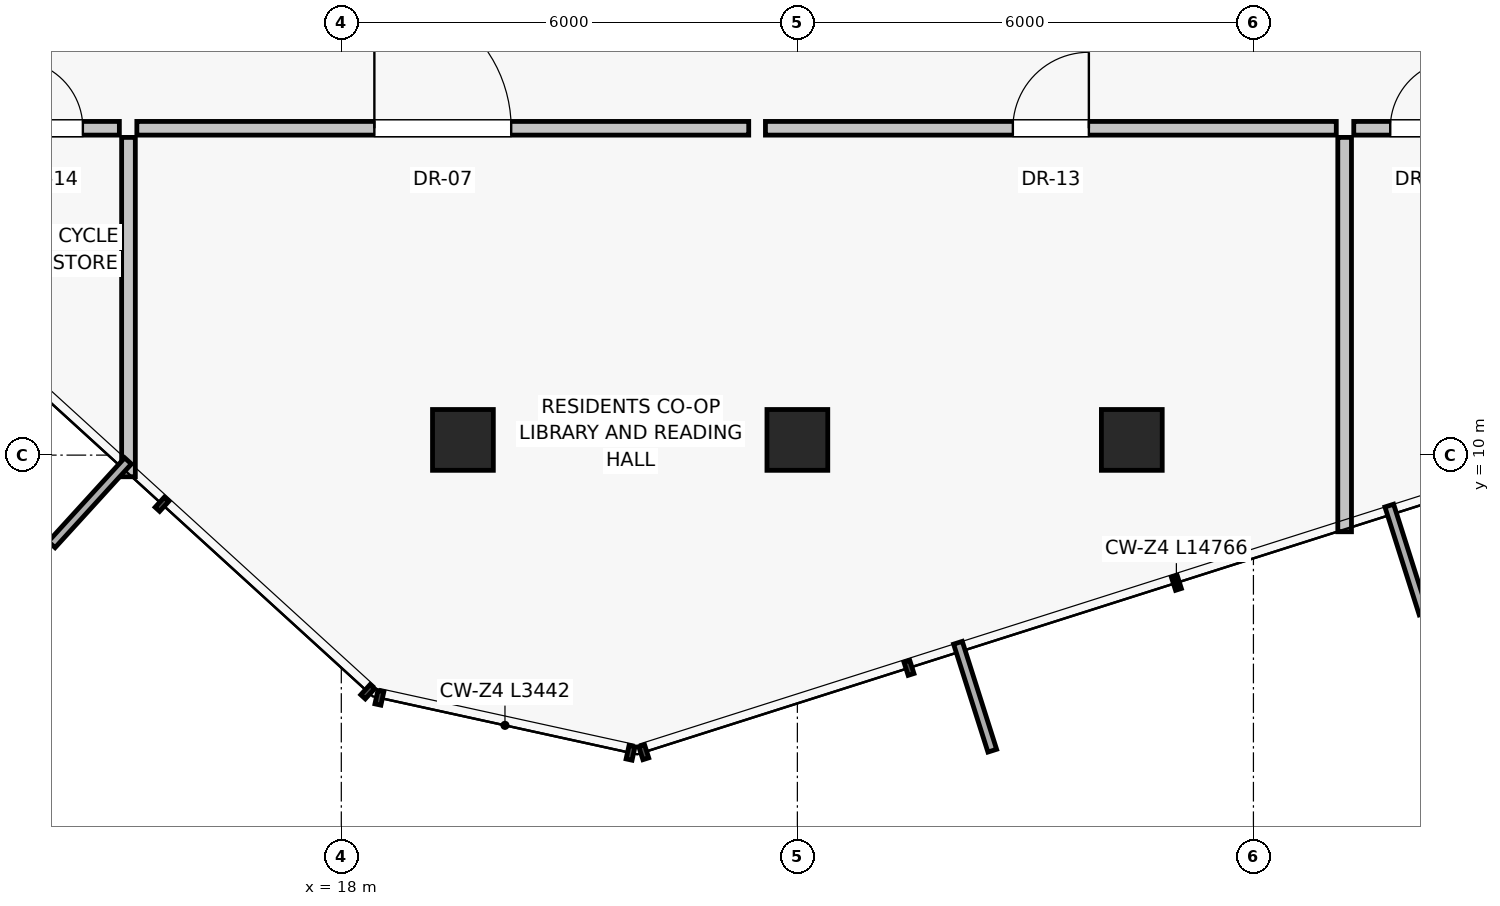
"""IFC4 building model, lengths in metres.
Left out: names, types, materials, properties, quantities, classifications, styles, units other than length and angle.
Written with IfcOpenShell. Run it as: python <this file> out.ifc"""

import sys

from ifc_helpers import new_model, si_unit, direction, frame, frame_2d, origin, origin_2d, place, context, subcontext, project, spatial, rectangle, extrude, source, transform, mapped, element, fill, save


model = new_model("IFC4")
c1 = context("Model", 3, precision=1e-05, world=origin(), true_north=direction((0.0, 1.0)))
c2 = subcontext(c1, "Body", "Model", "MODEL_VIEW")
j1 = project(units=[si_unit("LENGTHUNIT", "METRE"), si_unit("PLANEANGLEUNIT", "RADIAN")], contexts=[c1])
p1 = place(None, origin())
s1 = spatial("IfcSite", under=j1, at=p1, CompositionType="ELEMENT")
p2 = place(p1, origin())
s2 = spatial("IfcBuilding", under=s1, at=p2, CompositionType="ELEMENT")
p3 = place(p2, frame((0.0, 0.0, 251.25)))
s3 = spatial("IfcBuildingStorey", under=s2, at=p3, CompositionType="ELEMENT", Elevation=251.25)
for number, where, z_axis, x_axis in (
    (1, (19.6, 10.2, 0.0), (0.0, 0.0, 1.0), (1.0, 0.0, 0.0)),
    (2, (24.0, 10.2, 0.0), (0.0, 0.0, 1.0), (1.0, 0.0, 0.0)),
    (3, (28.4, 10.2, 0.0), (0.0, 0.0, 1.0), (1.0, 0.0, 0.0)),
):
    element("IfcColumn", number, at=place(p3, frame(where, z_axis=z_axis, x_axis=x_axis)), inside=s3, PredefinedType="COLUMN", context=c2, shape_type="SweptSolid", body=[
        extrude(rectangle(XDim=0.8, YDim=0.8, at=origin_2d()), origin(), (0.0, 0.0, 1.0), 3.25),
    ])
p4 = place(p3, frame((15.2, 14.18, 0.0), z_axis=(0.0, 0.0, 1.0), x_axis=(0.0, -1.0, 0.0)))
e4 = element("IfcWall", 4, at=p4, inside=s3, PredefinedType="PARTITIONING", context=c2, shape_type="SweptSolid", body=[
    extrude(rectangle(XDim=4.464, YDim=0.18, at=frame_2d((2.232, 0.0))), origin(), (0.0, 0.0, 1.0), 3.015),
])
p5 = place(p3, frame((31.2, 14.18, 0.0), z_axis=(0.0, 0.0, 1.0), x_axis=(0.0, -1.0, 0.0)))
e5 = element("IfcWall", 5, at=p5, inside=s3, PredefinedType="PARTITIONING", context=c2, shape_type="SweptSolid", body=[
    extrude(rectangle(XDim=5.188, YDim=0.18, at=frame_2d((2.594, 0.0))), origin(), (0.0, 0.0, 1.0), 3.015),
])
p6 = place(p3, frame((15.31, 14.3, 0.0), z_axis=(0.0, 0.0, 1.0), x_axis=(1.0, 0.0, 0.0)))
e6 = element("IfcWall", 6, at=p6, inside=s3, PredefinedType="PARTITIONING", context=c2, shape_type="SweptSolid", body=[
    extrude(rectangle(XDim=8.05, YDim=0.18, at=frame_2d((4.025, 0.0))), origin(), (0.0, 0.0, 1.0), 3.015),
])
p7 = place(p6, frame((3.125, 0.0, 0.0)))
e7 = element("IfcOpeningElement", 7, at=p7, cuts=e6, PredefinedType="OPENING", context=c2, shape_type="SweptSolid", body=[
    extrude(rectangle(XDim=1.8, YDim=2.25, at=frame_2d((0.9, 1.125))), frame((0.0, 0.1, 0.0), z_axis=(0.0, -1.0, 0.0), x_axis=(1.0, 0.0, 0.0)), (0.0, 0.0, 1.0), 0.2),
])
p8 = place(p3, frame((23.58, 14.3, 0.0), z_axis=(0.0, 0.0, 1.0), x_axis=(1.0, 0.0, 0.0)))
e8 = element("IfcWall", 8, at=p8, inside=s3, PredefinedType="PARTITIONING", context=c2, shape_type="SweptSolid", body=[
    extrude(rectangle(XDim=7.51, YDim=0.18, at=frame_2d((3.755, 0.0))), origin(), (0.0, 0.0, 1.0), 3.015),
])
p9 = place(p8, frame((3.255, 0.0, 0.0)))
e9 = element("IfcOpeningElement", 9, at=p9, cuts=e8, PredefinedType="OPENING", context=c2, shape_type="SweptSolid", body=[
    extrude(rectangle(XDim=1.0, YDim=2.01, at=frame_2d((0.5, 1.005))), frame((0.0, 0.1, 0.0), z_axis=(0.0, -1.0, 0.0), x_axis=(1.0, 0.0, 0.0)), (0.0, 0.0, 1.0), 0.2),
])
p10 = place(p3, frame((13.22, 14.3, 0.0), z_axis=(0.0, 0.0, 1.0), x_axis=(1.0, 0.0, 0.0)))
e10 = element("IfcWall", 10, at=p10, inside=s3, PredefinedType="PARTITIONING", context=c2, shape_type="SweptSolid", body=[
    extrude(rectangle(XDim=1.86, YDim=0.18, at=frame_2d((0.93, 0.0))), origin(), (0.0, 0.0, 1.0), 3.015),
])
p11 = place(p10, frame((0.48, 0.0, 0.0)))
e11 = element("IfcOpeningElement", 11, at=p11, cuts=e10, PredefinedType="OPENING", context=c2, shape_type="SweptSolid", body=[
    extrude(rectangle(XDim=0.9, YDim=2.01, at=frame_2d((0.45, 1.005))), frame((0.0, 0.1, 0.0), z_axis=(0.0, -1.0, 0.0), x_axis=(1.0, 0.0, 0.0)), (0.0, 0.0, 1.0), 0.2),
])
p12 = place(p3, frame((31.32, 14.3, 0.0), z_axis=(0.0, 0.0, 1.0), x_axis=(1.0, 0.0, 0.0)))
e12 = element("IfcWall", 12, at=p12, inside=s3, PredefinedType="PARTITIONING", context=c2, shape_type="SweptSolid", body=[
    extrude(rectangle(XDim=1.86, YDim=0.18, at=frame_2d((0.93, 0.0))), origin(), (0.0, 0.0, 1.0), 3.015),
])
p13 = place(p12, frame((0.48, 0.0, 0.0)))
e13 = element("IfcOpeningElement", 13, at=p13, cuts=e12, PredefinedType="OPENING", context=c2, shape_type="SweptSolid", body=[
    extrude(rectangle(XDim=0.9, YDim=2.01, at=frame_2d((0.45, 1.005))), frame((0.0, 0.1, 0.0), z_axis=(0.0, -1.0, 0.0), x_axis=(1.0, 0.0, 0.0)), (0.0, 0.0, 1.0), 0.2),
])
m1 = source(origin(), c2, "Body", "SweptSolid", [
    extrude(rectangle(XDim=1.8, YDim=2.25, at=frame_2d((0.9, 1.125))), frame((0.0, 0.025, 0.0), z_axis=(0.0, -1.0, 0.0), x_axis=(1.0, 0.0, 0.0)), (0.0, 0.0, 1.0), 0.05),
])
p14 = place(p7, origin())
e14 = element("IfcDoor", 14, at=p14, inside=s3, OperationType="SINGLE_SWING_LEFT", PredefinedType="DOOR", context=c2, shape_type="MappedRepresentation", body=[
    mapped(m1, transform((0.0, 0.0, 0.0), scale=1.0)),
])
fill(e7, e14)
m2 = source(origin(), c2, "Body", "SweptSolid", [
    extrude(rectangle(XDim=1.0, YDim=2.01, at=frame_2d((0.5, 1.005))), frame((0.0, 0.025, 0.0), z_axis=(0.0, -1.0, 0.0), x_axis=(1.0, 0.0, 0.0)), (0.0, 0.0, 1.0), 0.05),
])
p15 = place(p9, origin())
e15 = element("IfcDoor", 15, at=p15, inside=s3, OperationType="SINGLE_SWING_RIGHT", PredefinedType="DOOR", context=c2, shape_type="MappedRepresentation", body=[
    mapped(m2, transform((0.0, 0.0, 0.0), scale=1.0)),
])
fill(e9, e15)
m3 = source(origin(), c2, "Body", "SweptSolid", [
    extrude(rectangle(XDim=0.9, YDim=2.01, at=frame_2d((0.45, 1.005))), frame((0.0, 0.025, 0.0), z_axis=(0.0, -1.0, 0.0), x_axis=(1.0, 0.0, 0.0)), (0.0, 0.0, 1.0), 0.05),
])
p16 = place(p11, origin())
e16 = element("IfcDoor", 16, at=p16, inside=s3, OperationType="SINGLE_SWING_LEFT", PredefinedType="DOOR", context=c2, shape_type="MappedRepresentation", body=[
    mapped(m3, transform((0.0, 0.0, 0.0), scale=1.0)),
])
fill(e11, e16)
p17 = place(p13, origin())
e17 = element("IfcDoor", 17, at=p17, inside=s3, OperationType="SINGLE_SWING_RIGHT", PredefinedType="DOOR", context=c2, shape_type="MappedRepresentation", body=[
    mapped(m3, transform((0.0, 0.0, 0.0), scale=1.0)),
])
fill(e13, e17)
save(model, sys.argv[1])
